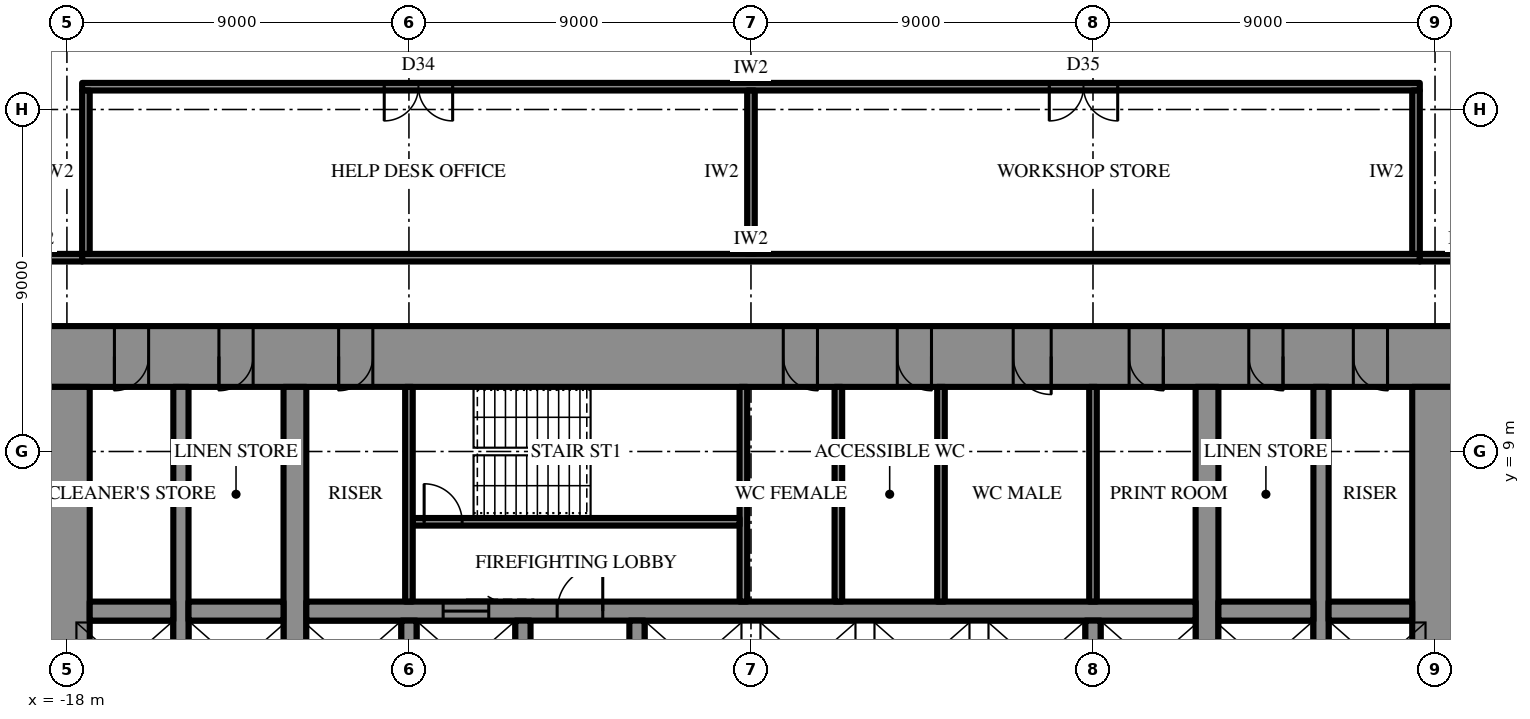
"""IFC4 building model, lengths in metres.
Left out: names, types, materials, properties, quantities, classifications, styles, units other than length and angle.
Written with IfcOpenShell. Run it as: python <this file> out.ifc"""

import sys

from ifc_helpers import new_model, si_unit, direction, frame, frame_2d, origin, place, context, subcontext, project, spatial, rectangle, extrude, element, fill, save


model = new_model("IFC4")
c1 = context("Model", 3, precision=1e-05, world=origin(), true_north=direction((0.0, 1.0)))
c2 = subcontext(c1, "Body", "Model", "MODEL_VIEW")
j1 = project(units=[si_unit("LENGTHUNIT", "METRE"), si_unit("PLANEANGLEUNIT", "RADIAN")], contexts=[c1])
p1 = place(None, origin())
s1 = spatial("IfcSite", under=j1, at=p1, CompositionType="ELEMENT")
p2 = place(p1, origin())
s2 = spatial("IfcBuilding", under=s1, at=p2, CompositionType="ELEMENT")
p3 = place(p2, frame((0.0, 0.0, 94.9)))
s3 = spatial("IfcBuildingStorey", under=s2, at=p3, CompositionType="ELEMENT", Elevation=94.9)
p4 = place(p3, frame((-18.6, 11.5, 0.0), z_axis=(0.0, 0.0, 1.0), x_axis=(1.0, 0.0, 0.0)))
e1 = element("IfcWall", 1, at=p4, inside=s3, PredefinedType="SHEAR", context=c2, shape_type="SweptSolid", body=[
    extrude(rectangle(XDim=37.2, YDim=1.6, at=frame_2d((18.6, 0.0))), origin(), (0.0, 0.0, 1.0), 4.2),
])
p5 = place(p4, frame((19.45, 0.0, 0.0)))
e2 = element("IfcOpeningElement", 2, at=p5, cuts=e1, PredefinedType="OPENING", context=c2, shape_type="SweptSolid", body=[
    extrude(rectangle(XDim=0.9, YDim=2.2, at=frame_2d((0.45, 1.1))), frame((0.0, 0.81, 0.0), z_axis=(0.0, -1.0, 0.0), x_axis=(1.0, 0.0, 0.0)), (0.0, 0.0, 1.0), 1.62),
])
p6 = place(p4, frame((22.45, 0.0, 0.0)))
e3 = element("IfcOpeningElement", 3, at=p6, cuts=e1, PredefinedType="OPENING", context=c2, shape_type="SweptSolid", body=[
    extrude(rectangle(XDim=0.9, YDim=2.2, at=frame_2d((0.45, 1.1))), frame((0.0, 0.81, 0.0), z_axis=(0.0, -1.0, 0.0), x_axis=(1.0, 0.0, 0.0)), (0.0, 0.0, 1.0), 1.62),
])
p7 = place(p4, frame((25.5, 0.0, 0.0)))
e4 = element("IfcOpeningElement", 4, at=p7, cuts=e1, PredefinedType="OPENING", context=c2, shape_type="SweptSolid", body=[
    extrude(rectangle(XDim=1.0, YDim=2.2, at=frame_2d((0.5, 1.1))), frame((0.0, 0.81, 0.0), z_axis=(0.0, -1.0, 0.0), x_axis=(1.0, 0.0, 0.0)), (0.0, 0.0, 1.0), 1.62),
])
p8 = place(p4, frame((1.85, 0.0, 0.0)))
e5 = element("IfcOpeningElement", 5, at=p8, cuts=e1, PredefinedType="OPENING", context=c2, shape_type="SweptSolid", body=[
    extrude(rectangle(XDim=0.9, YDim=2.2, at=frame_2d((0.45, 1.1))), frame((0.0, 0.81, 0.0), z_axis=(0.0, -1.0, 0.0), x_axis=(1.0, 0.0, 0.0)), (0.0, 0.0, 1.0), 1.62),
])
p9 = place(p4, frame((4.6, 0.0, 0.0)))
e6 = element("IfcOpeningElement", 6, at=p9, cuts=e1, PredefinedType="OPENING", context=c2, shape_type="SweptSolid", body=[
    extrude(rectangle(XDim=0.9, YDim=2.2, at=frame_2d((0.45, 1.1))), frame((0.0, 0.81, 0.0), z_axis=(0.0, -1.0, 0.0), x_axis=(1.0, 0.0, 0.0)), (0.0, 0.0, 1.0), 1.62),
])
p10 = place(p4, frame((7.75, 0.0, 0.0)))
e7 = element("IfcOpeningElement", 7, at=p10, cuts=e1, PredefinedType="OPENING", context=c2, shape_type="SweptSolid", body=[
    extrude(rectangle(XDim=0.9, YDim=2.2, at=frame_2d((0.45, 1.1))), frame((0.0, 0.81, 0.0), z_axis=(0.0, -1.0, 0.0), x_axis=(1.0, 0.0, 0.0)), (0.0, 0.0, 1.0), 1.62),
])
p11 = place(p4, frame((28.55, 0.0, 0.0)))
e8 = element("IfcOpeningElement", 8, at=p11, cuts=e1, PredefinedType="OPENING", context=c2, shape_type="SweptSolid", body=[
    extrude(rectangle(XDim=0.9, YDim=2.2, at=frame_2d((0.45, 1.1))), frame((0.0, 0.81, 0.0), z_axis=(0.0, -1.0, 0.0), x_axis=(1.0, 0.0, 0.0)), (0.0, 0.0, 1.0), 1.62),
])
p12 = place(p4, frame((31.7, 0.0, 0.0)))
e9 = element("IfcOpeningElement", 9, at=p12, cuts=e1, PredefinedType="OPENING", context=c2, shape_type="SweptSolid", body=[
    extrude(rectangle(XDim=0.9, YDim=2.2, at=frame_2d((0.45, 1.1))), frame((0.0, 0.81, 0.0), z_axis=(0.0, -1.0, 0.0), x_axis=(1.0, 0.0, 0.0)), (0.0, 0.0, 1.0), 1.62),
])
p13 = place(p4, frame((34.45, 0.0, 0.0)))
e10 = element("IfcOpeningElement", 10, at=p13, cuts=e1, PredefinedType="OPENING", context=c2, shape_type="SweptSolid", body=[
    extrude(rectangle(XDim=0.9, YDim=2.2, at=frame_2d((0.45, 1.1))), frame((0.0, 0.81, 0.0), z_axis=(0.0, -1.0, 0.0), x_axis=(1.0, 0.0, 0.0)), (0.0, 0.0, 1.0), 1.62),
])
p14 = place(p3, frame((18.0, -10.7, 0.0), z_axis=(0.0, 0.0, 1.0), x_axis=(0.0, 1.0, 0.0)))
e11 = element("IfcWall", 11, at=p14, inside=s3, PredefinedType="SHEAR", context=c2, shape_type="SweptSolid", body=[
    extrude(rectangle(XDim=21.4, YDim=1.2, at=frame_2d((10.7, 0.0))), origin(), (0.0, 0.0, 1.0), 4.2),
])
p15 = place(p14, frame((9.8, 0.0, 0.0)))
e12 = element("IfcOpeningElement", 12, at=p15, cuts=e11, PredefinedType="OPENING", context=c2, shape_type="SweptSolid", body=[
    extrude(rectangle(XDim=1.8, YDim=2.4, at=frame_2d((0.9, 1.2))), frame((0.0, 0.61, 0.0), z_axis=(0.0, -1.0, 0.0), x_axis=(1.0, 0.0, 0.0)), (0.0, 0.0, 1.0), 1.22),
])
p16 = place(p3, frame((-18.0, 10.7, 0.0), z_axis=(0.0, 0.0, 1.0), x_axis=(0.0, -1.0, 0.0)))
e13 = element("IfcWall", 13, at=p16, inside=s3, PredefinedType="SHEAR", context=c2, shape_type="SweptSolid", body=[
    extrude(rectangle(XDim=21.4, YDim=1.2, at=frame_2d((10.7, 0.0))), origin(), (0.0, 0.0, 1.0), 4.2),
])
p17 = place(p16, frame((9.8, 0.0, 0.0)))
e14 = element("IfcOpeningElement", 14, at=p17, cuts=e13, PredefinedType="OPENING", context=c2, shape_type="SweptSolid", body=[
    extrude(rectangle(XDim=1.8, YDim=2.4, at=frame_2d((0.9, 1.2))), frame((0.0, 0.61, 0.0), z_axis=(0.0, -1.0, 0.0), x_axis=(1.0, 0.0, 0.0)), (0.0, 0.0, 1.0), 1.22),
])
p18 = place(p3, frame((12.0, -10.7, 0.0), z_axis=(0.0, 0.0, 1.0), x_axis=(0.0, 1.0, 0.0)))
e15 = element("IfcWall", 15, at=p18, inside=s3, PredefinedType="SHEAR", context=c2, shape_type="SweptSolid", body=[
    extrude(rectangle(XDim=21.4, YDim=0.6, at=frame_2d((10.7, 0.0))), origin(), (0.0, 0.0, 1.0), 4.2),
])
p19 = place(p18, frame((9.8, 0.0, 0.0)))
e16 = element("IfcOpeningElement", 16, at=p19, cuts=e15, PredefinedType="OPENING", context=c2, shape_type="SweptSolid", body=[
    extrude(rectangle(XDim=1.8, YDim=2.4, at=frame_2d((0.9, 1.2))), frame((0.0, 0.31, 0.0), z_axis=(0.0, -1.0, 0.0), x_axis=(1.0, 0.0, 0.0)), (0.0, 0.0, 1.0), 0.62),
])
p20 = place(p3, frame((-12.0, -10.7, 0.0), z_axis=(0.0, 0.0, 1.0), x_axis=(0.0, 1.0, 0.0)))
e17 = element("IfcWall", 17, at=p20, inside=s3, PredefinedType="SHEAR", context=c2, shape_type="SweptSolid", body=[
    extrude(rectangle(XDim=21.4, YDim=0.6, at=frame_2d((10.7, 0.0))), origin(), (0.0, 0.0, 1.0), 4.2),
])
p21 = place(p20, frame((9.8, 0.0, 0.0)))
e18 = element("IfcOpeningElement", 18, at=p21, cuts=e17, PredefinedType="OPENING", context=c2, shape_type="SweptSolid", body=[
    extrude(rectangle(XDim=1.8, YDim=2.4, at=frame_2d((0.9, 1.2))), frame((0.0, 0.31, 0.0), z_axis=(0.0, -1.0, 0.0), x_axis=(1.0, 0.0, 0.0)), (0.0, 0.0, 1.0), 0.62),
])
p22 = place(p3, frame((15.0, -10.7, 0.0), z_axis=(0.0, 0.0, 1.0), x_axis=(0.0, 1.0, 0.0)))
e19 = element("IfcWall", 19, at=p22, inside=s3, PredefinedType="SHEAR", context=c2, shape_type="SweptSolid", body=[
    extrude(rectangle(XDim=21.4, YDim=0.4, at=frame_2d((10.7, 0.0))), origin(), (0.0, 0.0, 1.0), 4.2),
])
p23 = place(p22, frame((9.8, 0.0, 0.0)))
e20 = element("IfcOpeningElement", 20, at=p23, cuts=e19, PredefinedType="OPENING", context=c2, shape_type="SweptSolid", body=[
    extrude(rectangle(XDim=1.8, YDim=2.4, at=frame_2d((0.9, 1.2))), frame((0.0, 0.21, 0.0), z_axis=(0.0, -1.0, 0.0), x_axis=(1.0, 0.0, 0.0)), (0.0, 0.0, 1.0), 0.42),
])
p24 = place(p3, frame((-15.0, -10.7, 0.0), z_axis=(0.0, 0.0, 1.0), x_axis=(0.0, 1.0, 0.0)))
e21 = element("IfcWall", 21, at=p24, inside=s3, PredefinedType="SHEAR", context=c2, shape_type="SweptSolid", body=[
    extrude(rectangle(XDim=21.4, YDim=0.4, at=frame_2d((10.7, 0.0))), origin(), (0.0, 0.0, 1.0), 4.2),
])
p25 = place(p24, frame((9.8, 0.0, 0.0)))
e22 = element("IfcOpeningElement", 22, at=p25, cuts=e21, PredefinedType="OPENING", context=c2, shape_type="SweptSolid", body=[
    extrude(rectangle(XDim=1.8, YDim=2.4, at=frame_2d((0.9, 1.2))), frame((0.0, 0.21, 0.0), z_axis=(0.0, -1.0, 0.0), x_axis=(1.0, 0.0, 0.0)), (0.0, 0.0, 1.0), 0.42),
])
p26 = place(p3, frame((-17.4, 4.8, 0.0), z_axis=(0.0, 0.0, 1.0), x_axis=(1.0, 0.0, 0.0)))
e23 = element("IfcWall", 23, at=p26, inside=s3, PredefinedType="SHEAR", context=c2, shape_type="SweptSolid", body=[
    extrude(rectangle(XDim=2.2, YDim=0.5, at=frame_2d((1.1, 0.0))), origin(), (0.0, 0.0, 1.0), 4.2),
])
p27 = place(p3, frame((-14.8, 4.8, 0.0), z_axis=(0.0, 0.0, 1.0), x_axis=(1.0, 0.0, 0.0)))
e24 = element("IfcWall", 24, at=p27, inside=s3, PredefinedType="SHEAR", context=c2, shape_type="SweptSolid", body=[
    extrude(rectangle(XDim=2.5, YDim=0.5, at=frame_2d((1.25, 0.0))), origin(), (0.0, 0.0, 1.0), 4.2),
])
p28 = place(p3, frame((-11.7, 4.8, 0.0), z_axis=(0.0, 0.0, 1.0), x_axis=(1.0, 0.0, 0.0)))
e25 = element("IfcWall", 25, at=p28, inside=s3, PredefinedType="SHEAR", context=c2, shape_type="SweptSolid", body=[
    extrude(rectangle(XDim=23.4, YDim=0.5, at=frame_2d((11.7, 0.0))), origin(), (0.0, 0.0, 1.0), 4.2),
])
p29 = place(p28, frame((6.6, 0.0, 0.0)))
e26 = element("IfcOpeningElement", 26, at=p29, cuts=e25, PredefinedType="OPENING", context=c2, shape_type="SweptSolid", body=[
    extrude(rectangle(XDim=1.2, YDim=2.2, at=frame_2d((0.6, 1.1))), frame((0.0, 0.26, 0.0), z_axis=(0.0, -1.0, 0.0), x_axis=(1.0, 0.0, 0.0)), (0.0, 0.0, 1.0), 0.52),
])
p30 = place(p28, frame((3.6, 0.0, 0.0)))
e27 = element("IfcOpeningElement", 27, at=p30, cuts=e25, PredefinedType="OPENING", context=c2, shape_type="SweptSolid", body=[
    extrude(rectangle(XDim=1.2, YDim=2.2, at=frame_2d((0.6, 1.1))), frame((0.0, 0.26, 0.0), z_axis=(0.0, -1.0, 0.0), x_axis=(1.0, 0.0, 0.0)), (0.0, 0.0, 1.0), 0.52),
])
p31 = place(p3, frame((12.3, 4.8, 0.0), z_axis=(0.0, 0.0, 1.0), x_axis=(1.0, 0.0, 0.0)))
e28 = element("IfcWall", 28, at=p31, inside=s3, PredefinedType="SHEAR", context=c2, shape_type="SweptSolid", body=[
    extrude(rectangle(XDim=2.5, YDim=0.5, at=frame_2d((1.25, 0.0))), origin(), (0.0, 0.0, 1.0), 4.2),
])
p32 = place(p3, frame((15.2, 4.8, 0.0), z_axis=(0.0, 0.0, 1.0), x_axis=(1.0, 0.0, 0.0)))
e29 = element("IfcWall", 29, at=p32, inside=s3, PredefinedType="SHEAR", context=c2, shape_type="SweptSolid", body=[
    extrude(rectangle(XDim=2.2, YDim=0.5, at=frame_2d((1.1, 0.0))), origin(), (0.0, 0.0, 1.0), 4.2),
])
for number, where, z_axis, x_axis in (
    (30, (-9.0, 2.25, 0.0), (0.0, 0.0, 1.0), (0.0, 1.0, 0.0)),
    (31, (-6.0, 2.25, 0.0), (0.0, 0.0, 1.0), (0.0, 1.0, 0.0)),
    (32, (-3.0, 2.25, 0.0), (0.0, 0.0, 1.0), (0.0, 1.0, 0.0)),
    (33, (9.0, 2.25, 0.0), (0.0, 0.0, 1.0), (0.0, 1.0, 0.0)),
):
    element("IfcWall", number, at=place(p3, frame(where, z_axis=z_axis, x_axis=x_axis)), inside=s3, PredefinedType="SHEAR", context=c2, shape_type="SweptSolid", body=[
        extrude(rectangle(XDim=2.3, YDim=0.4, at=frame_2d((1.15, 0.0))), origin(), (0.0, 0.0, 1.0), 4.2),
    ])
p33 = place(p3, frame((-0.2, 5.05, 0.0), z_axis=(0.0, 0.0, 1.0), x_axis=(0.0, 1.0, 0.0)))
e34 = element("IfcWall", 34, at=p33, inside=s3, PredefinedType="SHEAR", context=c2, shape_type="SweptSolid", body=[
    extrude(rectangle(XDim=5.65, YDim=0.2, at=frame_2d((2.825, 0.0))), origin(), (0.0, 0.0, 1.0), 4.2),
])
p34 = place(p3, frame((-8.9, 7.15, 0.0), z_axis=(0.0, 0.0, 1.0), x_axis=(1.0, 0.0, 0.0)))
e35 = element("IfcWall", 35, at=p34, inside=s3, PredefinedType="SHEAR", context=c2, shape_type="SweptSolid", body=[
    extrude(rectangle(XDim=8.6, YDim=0.2, at=frame_2d((4.3, 0.0))), origin(), (0.0, 0.0, 1.0), 4.2),
])
p35 = place(p34, frame((0.3, 0.0, 0.0)))
e36 = element("IfcOpeningElement", 36, at=p35, cuts=e35, PredefinedType="OPENING", context=c2, shape_type="SweptSolid", body=[
    extrude(rectangle(XDim=1.0, YDim=2.2, at=frame_2d((0.5, 1.1))), frame((0.0, 0.11, 0.0), z_axis=(0.0, -1.0, 0.0), x_axis=(1.0, 0.0, 0.0)), (0.0, 0.0, 1.0), 0.22),
])
for number, where, z_axis, x_axis in (
    (37, (-9.0, 5.05, 0.0), (0.0, 0.0, 1.0), (0.0, 1.0, 0.0)),
    (38, (9.0, 5.05, 0.0), (0.0, 0.0, 1.0), (0.0, 1.0, 0.0)),
    (39, (2.3, 5.05, 0.0), (0.0, 0.0, 1.0), (0.0, 1.0, 0.0)),
    (40, (5.0, 5.05, 0.0), (0.0, 0.0, 1.0), (0.0, 1.0, 0.0)),
):
    element("IfcWall", number, at=place(p3, frame(where, z_axis=z_axis, x_axis=x_axis)), inside=s3, PredefinedType="PARTITIONING", context=c2, shape_type="SweptSolid", body=[
        extrude(rectangle(XDim=5.65, YDim=0.2, at=frame_2d((2.825, 0.0))), origin(), (0.0, 0.0, 1.0), 4.0),
    ])
p36 = place(p3, frame((-17.6, 14.1, 0.0), z_axis=(0.0, 0.0, 1.0), x_axis=(1.0, 0.0, 0.0)))
e41 = element("IfcWall", 41, at=p36, inside=s3, PredefinedType="PARTITIONING", context=c2, shape_type="SweptSolid", body=[
    extrude(rectangle(XDim=35.2, YDim=0.2, at=frame_2d((17.6, 0.0))), origin(), (0.0, 0.0, 1.0), 4.0),
])
p37 = place(p3, frame((-17.6, 18.6, 0.0), z_axis=(0.0, 0.0, 1.0), x_axis=(1.0, 0.0, 0.0)))
e42 = element("IfcWall", 42, at=p37, inside=s3, PredefinedType="PARTITIONING", context=c2, shape_type="SweptSolid", body=[
    extrude(rectangle(XDim=35.2, YDim=0.2, at=frame_2d((17.6, 0.0))), origin(), (0.0, 0.0, 1.0), 4.0),
])
p38 = place(p37, frame((7.95, 0.0, 0.0)))
e43 = element("IfcOpeningElement", 43, at=p38, cuts=e42, PredefinedType="OPENING", context=c2, shape_type="SweptSolid", body=[
    extrude(rectangle(XDim=1.8, YDim=2.4, at=frame_2d((0.9, 1.2))), frame((0.0, 0.11, 0.0), z_axis=(0.0, -1.0, 0.0), x_axis=(1.0, 0.0, 0.0)), (0.0, 0.0, 1.0), 0.22),
])
p39 = place(p37, frame((25.45, 0.0, 0.0)))
e44 = element("IfcOpeningElement", 44, at=p39, cuts=e42, PredefinedType="OPENING", context=c2, shape_type="SweptSolid", body=[
    extrude(rectangle(XDim=1.8, YDim=2.4, at=frame_2d((0.9, 1.2))), frame((0.0, 0.11, 0.0), z_axis=(0.0, -1.0, 0.0), x_axis=(1.0, 0.0, 0.0)), (0.0, 0.0, 1.0), 0.22),
])
p40 = place(p3, frame((-17.5, 14.2, 0.0), z_axis=(0.0, 0.0, 1.0), x_axis=(0.0, 1.0, 0.0)))
e45 = element("IfcWall", 45, at=p40, inside=s3, PredefinedType="PARTITIONING", context=c2, shape_type="SweptSolid", body=[
    extrude(rectangle(XDim=4.3, YDim=0.2, at=frame_2d((2.15, 0.0))), origin(), (0.0, 0.0, 1.0), 4.0),
])
p41 = place(p3, frame((0.0, 14.2, 0.0), z_axis=(0.0, 0.0, 1.0), x_axis=(0.0, 1.0, 0.0)))
e46 = element("IfcWall", 46, at=p41, inside=s3, PredefinedType="PARTITIONING", context=c2, shape_type="SweptSolid", body=[
    extrude(rectangle(XDim=4.3, YDim=0.2, at=frame_2d((2.15, 0.0))), origin(), (0.0, 0.0, 1.0), 2.944),
])
p42 = place(p3, frame((17.5, 14.2, 0.0), z_axis=(0.0, 0.0, 1.0), x_axis=(0.0, 1.0, 0.0)))
e47 = element("IfcWall", 47, at=p42, inside=s3, PredefinedType="PARTITIONING", context=c2, shape_type="SweptSolid", body=[
    extrude(rectangle(XDim=4.3, YDim=0.2, at=frame_2d((2.15, 0.0))), origin(), (0.0, 0.0, 1.0), 4.0),
])
for number, where, z_axis, x_axis in (
    (48, (-20.0, 14.1, 0.0), (0.0, 0.0, 1.0), (1.0, 0.0, 0.0)),
    (49, (17.6, 14.1, 0.0), (0.0, 0.0, 1.0), (1.0, 0.0, 0.0)),
):
    element("IfcWall", number, at=place(p3, frame(where, z_axis=z_axis, x_axis=x_axis)), inside=s3, PredefinedType="PARTITIONING", context=c2, shape_type="SweptSolid", body=[
        extrude(rectangle(XDim=2.4, YDim=0.2, at=frame_2d((1.2, 0.0))), origin(), (0.0, 0.0, 1.0), 4.0),
    ])
p43 = place(p29, origin())
e50 = element("IfcDoor", 50, at=p43, inside=s3, OperationType="SINGLE_SWING_LEFT", PredefinedType="DOOR", context=c2, shape_type="SweptSolid", body=[
    extrude(rectangle(XDim=1.2, YDim=2.2, at=frame_2d((0.6, 1.1))), frame((0.0, 0.025, 0.0), z_axis=(0.0, -1.0, 0.0), x_axis=(1.0, 0.0, 0.0)), (0.0, 0.0, 1.0), 0.05),
])
fill(e26, e50)
p44 = place(p35, origin())
e51 = element("IfcDoor", 51, at=p44, inside=s3, OperationType="SINGLE_SWING_RIGHT", PredefinedType="DOOR", context=c2, shape_type="SweptSolid", body=[
    extrude(rectangle(XDim=1.0, YDim=2.2, at=frame_2d((0.5, 1.1))), frame((0.0, 0.025, 0.0), z_axis=(0.0, -1.0, 0.0), x_axis=(1.0, 0.0, 0.0)), (0.0, 0.0, 1.0), 0.05),
])
fill(e36, e51)
p45 = place(p5, frame((0.9, 0.0, 0.0), z_axis=(0.0, 0.0, 1.0), x_axis=(-1.0, 0.0, 0.0)))
e52 = element("IfcDoor", 52, at=p45, inside=s3, OperationType="SINGLE_SWING_RIGHT", PredefinedType="DOOR", context=c2, shape_type="SweptSolid", body=[
    extrude(rectangle(XDim=0.9, YDim=2.2, at=frame_2d((0.45, 1.1))), frame((0.0, 0.025, 0.0), z_axis=(0.0, -1.0, 0.0), x_axis=(1.0, 0.0, 0.0)), (0.0, 0.0, 1.0), 0.05),
])
fill(e2, e52)
p46 = place(p6, frame((0.9, 0.0, 0.0), z_axis=(0.0, 0.0, 1.0), x_axis=(-1.0, 0.0, 0.0)))
e53 = element("IfcDoor", 53, at=p46, inside=s3, OperationType="SINGLE_SWING_RIGHT", PredefinedType="DOOR", context=c2, shape_type="SweptSolid", body=[
    extrude(rectangle(XDim=0.9, YDim=2.2, at=frame_2d((0.45, 1.1))), frame((0.0, 0.025, 0.0), z_axis=(0.0, -1.0, 0.0), x_axis=(1.0, 0.0, 0.0)), (0.0, 0.0, 1.0), 0.05),
])
fill(e3, e53)
p47 = place(p7, frame((1.0, 0.0, 0.0), z_axis=(0.0, 0.0, 1.0), x_axis=(-1.0, 0.0, 0.0)))
e54 = element("IfcDoor", 54, at=p47, inside=s3, OperationType="SINGLE_SWING_RIGHT", PredefinedType="DOOR", context=c2, shape_type="SweptSolid", body=[
    extrude(rectangle(XDim=1.0, YDim=2.2, at=frame_2d((0.5, 1.1))), frame((0.0, 0.025, 0.0), z_axis=(0.0, -1.0, 0.0), x_axis=(1.0, 0.0, 0.0)), (0.0, 0.0, 1.0), 0.05),
])
fill(e4, e54)
p48 = place(p8, frame((0.9, 0.0, 0.0), z_axis=(0.0, 0.0, 1.0), x_axis=(-1.0, 0.0, 0.0)))
e55 = element("IfcDoor", 55, at=p48, inside=s3, OperationType="SINGLE_SWING_LEFT", PredefinedType="DOOR", context=c2, shape_type="SweptSolid", body=[
    extrude(rectangle(XDim=0.9, YDim=2.2, at=frame_2d((0.45, 1.1))), frame((0.0, 0.025, 0.0), z_axis=(0.0, -1.0, 0.0), x_axis=(1.0, 0.0, 0.0)), (0.0, 0.0, 1.0), 0.05),
])
fill(e5, e55)
p49 = place(p9, frame((0.9, 0.0, 0.0), z_axis=(0.0, 0.0, 1.0), x_axis=(-1.0, 0.0, 0.0)))
e56 = element("IfcDoor", 56, at=p49, inside=s3, OperationType="SINGLE_SWING_LEFT", PredefinedType="DOOR", context=c2, shape_type="SweptSolid", body=[
    extrude(rectangle(XDim=0.9, YDim=2.2, at=frame_2d((0.45, 1.1))), frame((0.0, 0.025, 0.0), z_axis=(0.0, -1.0, 0.0), x_axis=(1.0, 0.0, 0.0)), (0.0, 0.0, 1.0), 0.05),
])
fill(e6, e56)
p50 = place(p10, frame((0.9, 0.0, 0.0), z_axis=(0.0, 0.0, 1.0), x_axis=(-1.0, 0.0, 0.0)))
e57 = element("IfcDoor", 57, at=p50, inside=s3, OperationType="SINGLE_SWING_LEFT", PredefinedType="DOOR", context=c2, shape_type="SweptSolid", body=[
    extrude(rectangle(XDim=0.9, YDim=2.2, at=frame_2d((0.45, 1.1))), frame((0.0, 0.025, 0.0), z_axis=(0.0, -1.0, 0.0), x_axis=(1.0, 0.0, 0.0)), (0.0, 0.0, 1.0), 0.05),
])
fill(e7, e57)
p51 = place(p11, frame((0.9, 0.0, 0.0), z_axis=(0.0, 0.0, 1.0), x_axis=(-1.0, 0.0, 0.0)))
e58 = element("IfcDoor", 58, at=p51, inside=s3, OperationType="SINGLE_SWING_RIGHT", PredefinedType="DOOR", context=c2, shape_type="SweptSolid", body=[
    extrude(rectangle(XDim=0.9, YDim=2.2, at=frame_2d((0.45, 1.1))), frame((0.0, 0.025, 0.0), z_axis=(0.0, -1.0, 0.0), x_axis=(1.0, 0.0, 0.0)), (0.0, 0.0, 1.0), 0.05),
])
fill(e8, e58)
p52 = place(p12, frame((0.9, 0.0, 0.0), z_axis=(0.0, 0.0, 1.0), x_axis=(-1.0, 0.0, 0.0)))
e59 = element("IfcDoor", 59, at=p52, inside=s3, OperationType="SINGLE_SWING_RIGHT", PredefinedType="DOOR", context=c2, shape_type="SweptSolid", body=[
    extrude(rectangle(XDim=0.9, YDim=2.2, at=frame_2d((0.45, 1.1))), frame((0.0, 0.025, 0.0), z_axis=(0.0, -1.0, 0.0), x_axis=(1.0, 0.0, 0.0)), (0.0, 0.0, 1.0), 0.05),
])
fill(e9, e59)
p53 = place(p13, frame((0.9, 0.0, 0.0), z_axis=(0.0, 0.0, 1.0), x_axis=(-1.0, 0.0, 0.0)))
e60 = element("IfcDoor", 60, at=p53, inside=s3, OperationType="SINGLE_SWING_RIGHT", PredefinedType="DOOR", context=c2, shape_type="SweptSolid", body=[
    extrude(rectangle(XDim=0.9, YDim=2.2, at=frame_2d((0.45, 1.1))), frame((0.0, 0.025, 0.0), z_axis=(0.0, -1.0, 0.0), x_axis=(1.0, 0.0, 0.0)), (0.0, 0.0, 1.0), 0.05),
])
fill(e10, e60)
p54 = place(p30, origin())
e61 = element("IfcDoor", 61, at=p54, inside=s3, OperationType="SLIDING_TO_LEFT", PredefinedType="DOOR", context=c2, shape_type="SweptSolid", body=[
    extrude(rectangle(XDim=1.2, YDim=2.2, at=frame_2d((0.6, 1.1))), frame((0.0, 0.025, 0.0), z_axis=(0.0, -1.0, 0.0), x_axis=(1.0, 0.0, 0.0)), (0.0, 0.0, 1.0), 0.05),
])
fill(e27, e61)
p55 = place(p38, frame((1.8, 0.0, 0.0), z_axis=(0.0, 0.0, 1.0), x_axis=(-1.0, 0.0, 0.0)))
e62 = element("IfcDoor", 62, at=p55, inside=s3, OperationType="DOUBLE_DOOR_SINGLE_SWING", PredefinedType="DOOR", context=c2, shape_type="SweptSolid", body=[
    extrude(rectangle(XDim=1.8, YDim=2.4, at=frame_2d((0.9, 1.2))), frame((0.0, 0.025, 0.0), z_axis=(0.0, -1.0, 0.0), x_axis=(1.0, 0.0, 0.0)), (0.0, 0.0, 1.0), 0.05),
])
fill(e43, e62)
p56 = place(p39, frame((1.8, 0.0, 0.0), z_axis=(0.0, 0.0, 1.0), x_axis=(-1.0, 0.0, 0.0)))
e63 = element("IfcDoor", 63, at=p56, inside=s3, OperationType="DOUBLE_DOOR_SINGLE_SWING", PredefinedType="DOOR", context=c2, shape_type="SweptSolid", body=[
    extrude(rectangle(XDim=1.8, YDim=2.4, at=frame_2d((0.9, 1.2))), frame((0.0, 0.025, 0.0), z_axis=(0.0, -1.0, 0.0), x_axis=(1.0, 0.0, 0.0)), (0.0, 0.0, 1.0), 0.05),
])
fill(e44, e63)
save(model, sys.argv[1])
